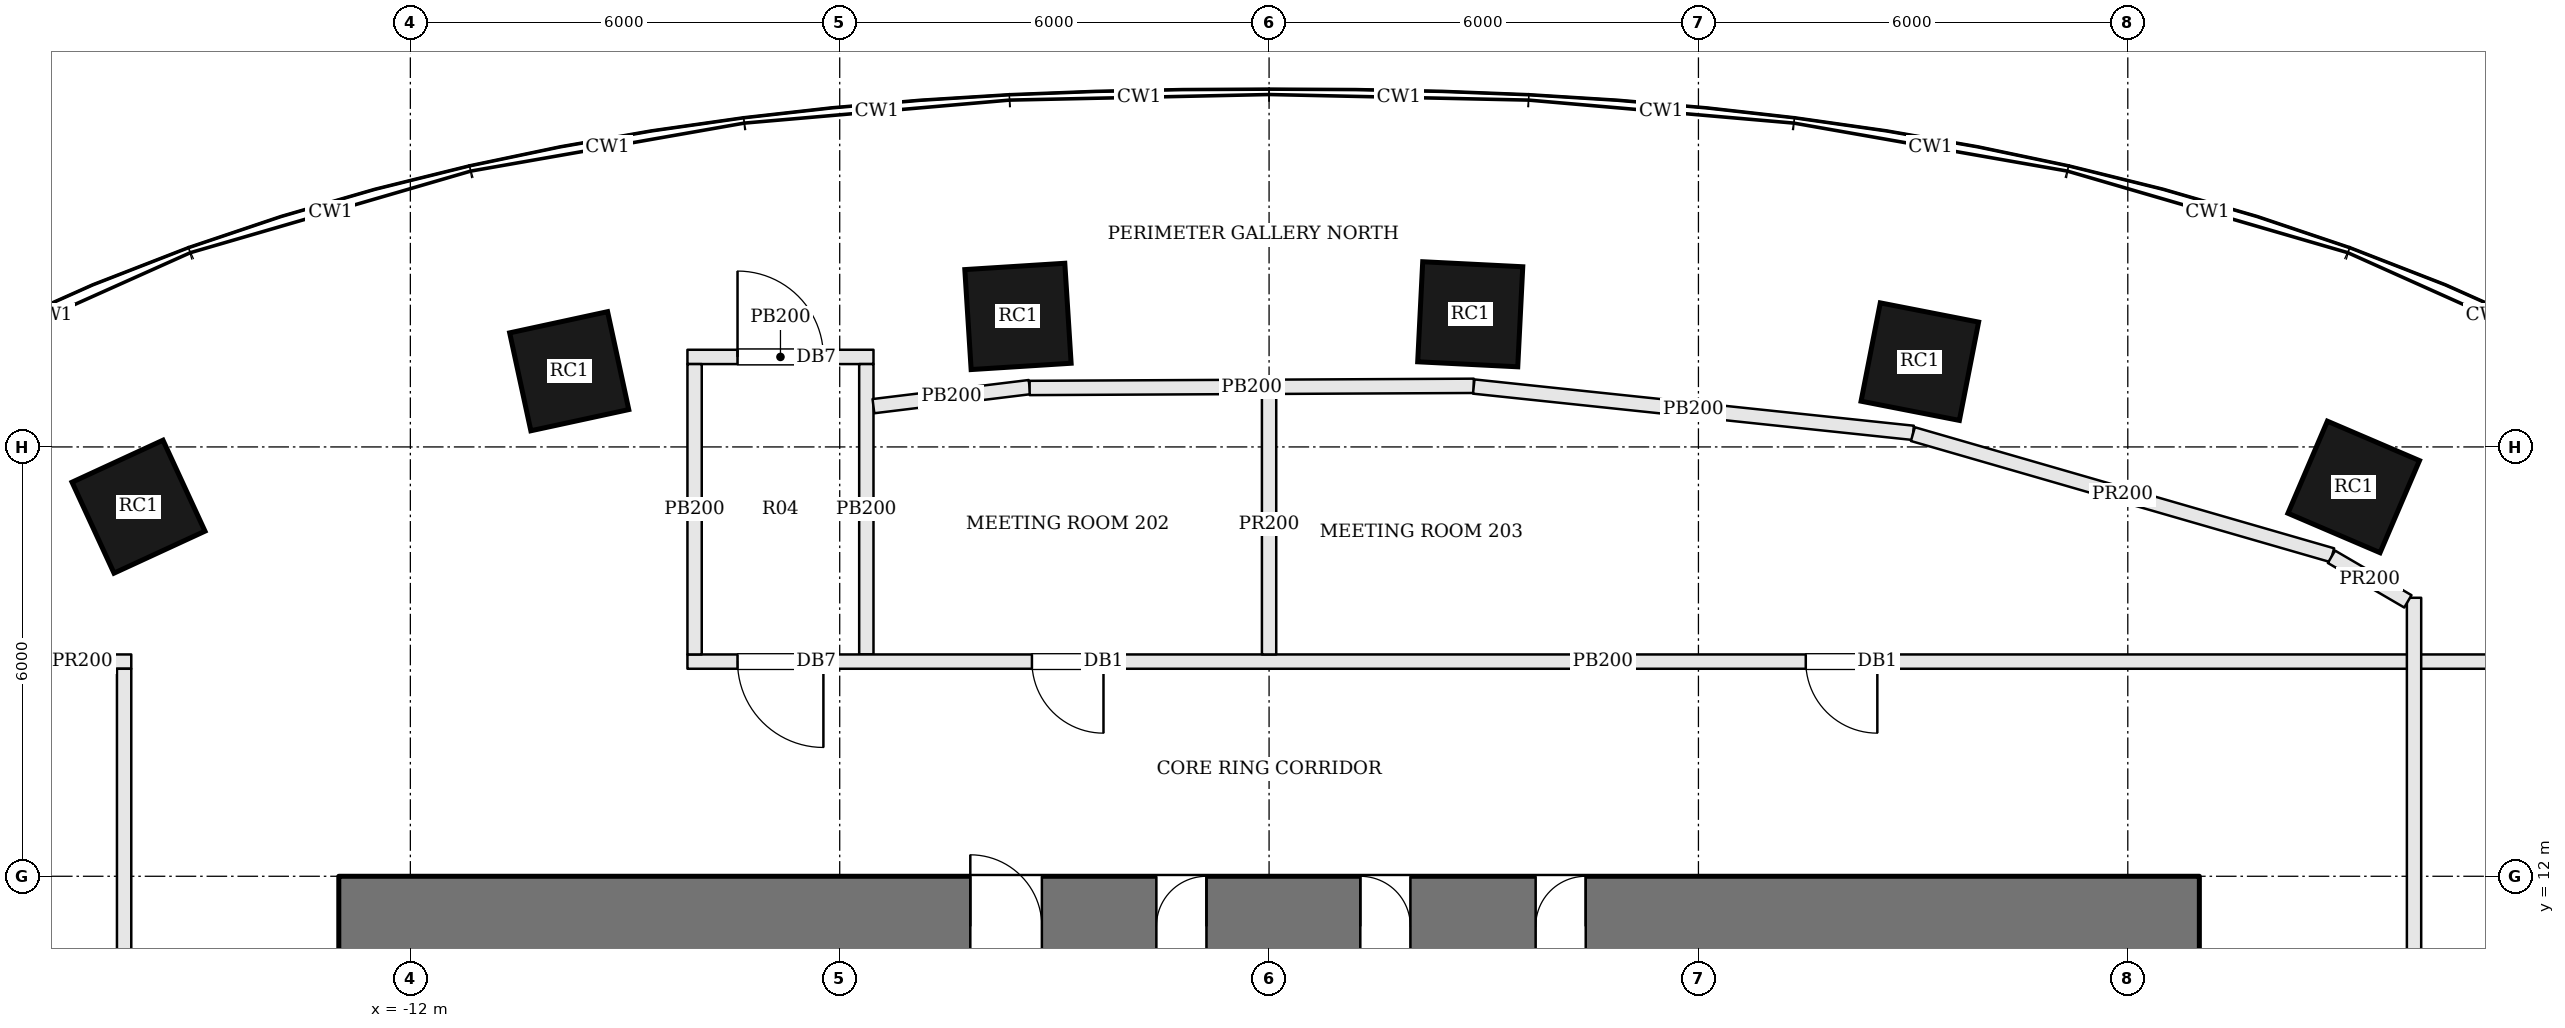
"""IFC4 building model, lengths in metres.
Left out: names, types, materials, properties, quantities, classifications, styles, units other than length and angle.
Written with IfcOpenShell. Run it as: python <this file> out.ifc"""

import sys

from ifc_helpers import new_model, si_unit, direction, frame, frame_2d, origin, origin_2d, place, context, subcontext, project, spatial, rectangle, extrude, element, fill, save


model = new_model("IFC4")
c1 = context("Model", 3, precision=1e-05, world=origin(), true_north=direction((0.0, 1.0)))
c2 = subcontext(c1, "Body", "Model", "MODEL_VIEW")
j1 = project(units=[si_unit("LENGTHUNIT", "METRE"), si_unit("PLANEANGLEUNIT", "RADIAN")], contexts=[c1])
p1 = place(None, origin())
s1 = spatial("IfcSite", under=j1, at=p1, CompositionType="ELEMENT")
p2 = place(p1, origin())
s2 = spatial("IfcBuilding", under=s1, at=p2, CompositionType="ELEMENT")
p3 = place(p2, frame((0.0, 0.0, 15.0)))
s3 = spatial("IfcBuildingStorey", under=s2, at=p3, CompositionType="ELEMENT", Elevation=15.0)
p4 = place(p3, frame((-13.0, 11.3, 0.0), z_axis=(0.0, 0.0, 1.0), x_axis=(1.0, 0.0, 0.0)))
e1 = element("IfcWall", 1, at=p4, inside=s3, PredefinedType="SHEAR", context=c2, shape_type="SweptSolid", body=[
    extrude(rectangle(XDim=26.0, YDim=1.4, at=frame_2d((13.0, 0.0))), origin(), (0.0, 0.0, 1.0), 7.8),
])
p5 = place(p4, frame((8.825, 0.0, 0.0)))
e2 = element("IfcOpeningElement", 2, at=p5, cuts=e1, PredefinedType="OPENING", context=c2, shape_type="SweptSolid", body=[
    extrude(rectangle(XDim=1.0, YDim=2.1, at=frame_2d((0.5, 1.05))), frame((0.0, 0.71, 0.0), z_axis=(0.0, -1.0, 0.0), x_axis=(1.0, 0.0, 0.0)), (0.0, 0.0, 1.0), 1.42),
])
p6 = place(p4, frame((11.425, 0.0, 0.0)))
e3 = element("IfcOpeningElement", 3, at=p6, cuts=e1, PredefinedType="OPENING", context=c2, shape_type="SweptSolid", body=[
    extrude(rectangle(XDim=0.7, YDim=2.1, at=frame_2d((0.35, 1.05))), frame((0.0, 0.71, 0.0), z_axis=(0.0, -1.0, 0.0), x_axis=(1.0, 0.0, 0.0)), (0.0, 0.0, 1.0), 1.42),
])
p7 = place(p4, frame((14.275, 0.0, 0.0)))
e4 = element("IfcOpeningElement", 4, at=p7, cuts=e1, PredefinedType="OPENING", context=c2, shape_type="SweptSolid", body=[
    extrude(rectangle(XDim=0.7, YDim=2.1, at=frame_2d((0.35, 1.05))), frame((0.0, 0.71, 0.0), z_axis=(0.0, -1.0, 0.0), x_axis=(1.0, 0.0, 0.0)), (0.0, 0.0, 1.0), 1.42),
])
p8 = place(p4, frame((16.725, 0.0, 0.0)))
e5 = element("IfcOpeningElement", 5, at=p8, cuts=e1, PredefinedType="OPENING", context=c2, shape_type="SweptSolid", body=[
    extrude(rectangle(XDim=0.7, YDim=2.1, at=frame_2d((0.35, 1.05))), frame((0.0, 0.71, 0.0), z_axis=(0.0, -1.0, 0.0), x_axis=(1.0, 0.0, 0.0)), (0.0, 0.0, 1.0), 1.42),
])
for number, where, z_axis, x_axis in (
    (6, (15.157, 17.441, 0.0), (0.0, 0.0, 1.0), (-0.919, 0.394, 0.0)),
    (7, (9.094, 19.192, 0.0), (0.0, 0.0, 1.0), (-0.981, 0.192, 0.0)),
    (8, (2.811, 19.854, 0.0), (0.0, 0.0, 1.0), (-0.999, 0.05, 0.0)),
    (9, (-3.509, 19.824, 0.0), (0.0, 0.0, 1.0), (-0.998, -0.063, 0.0)),
    (10, (-9.78, 19.058, 0.0), (0.0, 0.0, 1.0), (-0.977, -0.211, 0.0)),
    (11, (-15.799, 17.165, 0.0), (0.0, 0.0, 1.0), (-0.908, -0.419, 0.0)),
):
    element("IfcColumn", number, at=place(p3, frame(where, z_axis=z_axis, x_axis=x_axis)), inside=s3, PredefinedType="COLUMN", context=c2, shape_type="SweptSolid", body=[
        extrude(rectangle(XDim=1.4, YDim=1.4, at=origin_2d()), origin(), (0.0, 0.0, 1.0), 7.8),
    ])
p9 = place(p3, frame((-8.128, 19.258, 0.0), z_axis=(0.0, 0.0, 1.0), x_axis=(1.0, 0.0, 0.0)))
e12 = element("IfcWall", 12, at=p9, inside=s3, PredefinedType="PARTITIONING", context=c2, shape_type="SweptSolid", body=[
    extrude(rectangle(XDim=2.6, YDim=0.2, at=frame_2d((1.3, 0.0))), origin(), (0.0, 0.0, 1.0), 6.83),
])
p10 = place(p9, frame((0.7, 0.0, 0.0)))
e13 = element("IfcOpeningElement", 13, at=p10, cuts=e12, PredefinedType="OPENING", context=c2, shape_type="SweptSolid", body=[
    extrude(rectangle(XDim=1.2, YDim=2.1, at=frame_2d((0.6, 1.05))), frame((0.0, 0.11, 0.0), z_axis=(0.0, -1.0, 0.0), x_axis=(1.0, 0.0, 0.0)), (0.0, 0.0, 1.0), 0.22),
])
p11 = place(p3, frame((-5.628, 19.158, 0.0), z_axis=(0.0, 0.0, 1.0), x_axis=(0.0, -1.0, 0.0)))
e14 = element("IfcWall", 14, at=p11, inside=s3, PredefinedType="PARTITIONING", context=c2, shape_type="SweptSolid", body=[
    extrude(rectangle(XDim=4.058, YDim=0.2, at=frame_2d((2.029, 0.0))), origin(), (0.0, 0.0, 1.0), 6.83),
])
p12 = place(p3, frame((17.457, 15.0, 0.0), z_axis=(0.0, 0.0, 1.0), x_axis=(-1.0, 0.0, 0.0)))
e15 = element("IfcWall", 15, at=p12, inside=s3, PredefinedType="PARTITIONING", context=c2, shape_type="SweptSolid", body=[
    extrude(rectangle(XDim=25.585, YDim=0.2, at=frame_2d((12.792, 0.0))), origin(), (0.0, 0.0, 1.0), 6.83),
])
p13 = place(p12, frame((23.685, 0.0, 0.0)))
e16 = element("IfcOpeningElement", 16, at=p13, cuts=e15, PredefinedType="OPENING", context=c2, shape_type="SweptSolid", body=[
    extrude(rectangle(XDim=1.2, YDim=2.1, at=frame_2d((0.6, 1.05))), frame((0.0, 0.11, 0.0), z_axis=(0.0, -1.0, 0.0), x_axis=(1.0, 0.0, 0.0)), (0.0, 0.0, 1.0), 0.22),
])
p14 = place(p12, frame((19.771, 0.0, 0.0)))
e17 = element("IfcOpeningElement", 17, at=p14, cuts=e15, PredefinedType="OPENING", context=c2, shape_type="SweptSolid", body=[
    extrude(rectangle(XDim=1.0, YDim=2.1, at=frame_2d((0.5, 1.05))), frame((0.0, 0.11, 0.0), z_axis=(0.0, -1.0, 0.0), x_axis=(1.0, 0.0, 0.0)), (0.0, 0.0, 1.0), 0.22),
])
p15 = place(p12, frame((8.957, 0.0, 0.0)))
e18 = element("IfcOpeningElement", 18, at=p15, cuts=e15, PredefinedType="OPENING", context=c2, shape_type="SweptSolid", body=[
    extrude(rectangle(XDim=1.0, YDim=2.1, at=frame_2d((0.5, 1.05))), frame((0.0, 0.11, 0.0), z_axis=(0.0, -1.0, 0.0), x_axis=(1.0, 0.0, 0.0)), (0.0, 0.0, 1.0), 0.22),
])
p16 = place(p3, frame((-8.028, 15.1, 0.0), z_axis=(0.0, 0.0, 1.0), x_axis=(0.0, 1.0, 0.0)))
e19 = element("IfcWall", 19, at=p16, inside=s3, PredefinedType="PARTITIONING", context=c2, shape_type="SweptSolid", body=[
    extrude(rectangle(XDim=4.058, YDim=0.2, at=frame_2d((2.029, 0.0))), origin(), (0.0, 0.0, 1.0), 6.83),
])
p17 = place(p3, frame((-17.268, 15.0, 0.0), z_axis=(0.0, 0.0, 1.0), x_axis=(1.0, 0.0, 0.0)))
e20 = element("IfcWall", 20, at=p17, inside=s3, PredefinedType="PARTITIONING", context=c2, shape_type="SweptSolid", body=[
    extrude(rectangle(XDim=1.368, YDim=0.2, at=frame_2d((0.684, 0.0))), origin(), (0.0, 0.0, 1.0), 6.934),
])
p18 = place(p3, frame((-16.0, 14.9, 0.0), z_axis=(0.0, 0.0, 1.0), x_axis=(0.0, -1.0, 0.0)))
e21 = element("IfcWall", 21, at=p18, inside=s3, PredefinedType="PARTITIONING", context=c2, shape_type="SweptSolid", body=[
    extrude(rectangle(XDim=20.8, YDim=0.2, at=frame_2d((10.4, 0.0))), origin(), (0.0, 0.0, 1.0), 6.83),
])
p19 = place(p18, frame((9.9, 0.0, 0.0)))
e22 = element("IfcOpeningElement", 22, at=p19, cuts=e21, PredefinedType="OPENING", context=c2, shape_type="SweptSolid", body=[
    extrude(rectangle(XDim=1.0, YDim=2.1, at=frame_2d((0.5, 1.05))), frame((0.0, 0.11, 0.0), z_axis=(0.0, -1.0, 0.0), x_axis=(1.0, 0.0, 0.0)), (0.0, 0.0, 1.0), 0.22),
])
p20 = place(p3, frame((16.0, -5.9, 0.0), z_axis=(0.0, 0.0, 1.0), x_axis=(0.0, 1.0, 0.0)))
e23 = element("IfcWall", 23, at=p20, inside=s3, PredefinedType="PARTITIONING", context=c2, shape_type="SweptSolid", body=[
    extrude(rectangle(XDim=21.792, YDim=0.2, at=frame_2d((10.896, 0.0))), origin(), (0.0, 0.0, 1.0), 6.83),
])
p21 = place(p20, frame((9.9, 0.0, 0.0)))
e24 = element("IfcOpeningElement", 24, at=p21, cuts=e23, PredefinedType="OPENING", context=c2, shape_type="SweptSolid", body=[
    extrude(rectangle(XDim=1.0, YDim=2.1, at=frame_2d((0.5, 1.05))), frame((0.0, 0.11, 0.0), z_axis=(0.0, -1.0, 0.0), x_axis=(1.0, 0.0, 0.0)), (0.0, 0.0, 1.0), 0.22),
])
p22 = place(p3, frame((-5.529, 18.57, 0.0), z_axis=(0.0, 0.0, 1.0), x_axis=(0.992659217013, 0.120944941522, 0.0)))
e25 = element("IfcWall", 25, at=p22, inside=s3, PredefinedType="PARTITIONING", context=c2, shape_type="SweptSolid", body=[
    extrude(rectangle(XDim=2.198, YDim=0.2, at=frame_2d((1.099, 0.0))), origin(), (0.0, 0.0, 1.0), 6.83),
])
p23 = place(p3, frame((-3.346, 18.824, 0.0), z_axis=(0.0, 0.0, 1.0), x_axis=(0.999988297333, 0.004837891778, 0.0)))
e26 = element("IfcWall", 26, at=p23, inside=s3, PredefinedType="PARTITIONING", context=c2, shape_type="SweptSolid", body=[
    extrude(rectangle(XDim=6.207, YDim=0.2, at=frame_2d((3.104, 0.0))), origin(), (0.0, 0.0, 1.0), 6.83),
])
p24 = place(p3, frame((0.0, 18.741, 0.0), z_axis=(0.0, 0.0, 1.0), x_axis=(0.0, -1.0, 0.0)))
e27 = element("IfcWall", 27, at=p24, inside=s3, PredefinedType="PARTITIONING", context=c2, shape_type="SweptSolid", body=[
    extrude(rectangle(XDim=3.641, YDim=0.2, at=frame_2d((1.82, 0.0))), origin(), (0.0, 0.0, 1.0), 6.934),
])
p25 = place(p3, frame((2.86, 18.844, 0.0), z_axis=(0.0, 0.0, 1.0), x_axis=(0.994494179805, -0.10479182379, 0.0)))
e28 = element("IfcWall", 28, at=p25, inside=s3, PredefinedType="PARTITIONING", context=c2, shape_type="SweptSolid", body=[
    extrude(rectangle(XDim=6.174, YDim=0.2, at=frame_2d((3.087, 0.0))), origin(), (0.0, 0.0, 1.0), 6.83),
])
p26 = place(p3, frame((8.997, 18.179, 0.0), z_axis=(0.0, 0.0, 1.0), x_axis=(0.960743591904, -0.277437831982, 0.0)))
e29 = element("IfcWall", 29, at=p26, inside=s3, PredefinedType="PARTITIONING", context=c2, shape_type="SweptSolid", body=[
    extrude(rectangle(XDim=6.098, YDim=0.2, at=frame_2d((3.049, 0.0))), origin(), (0.0, 0.0, 1.0), 6.934),
])
p27 = place(p3, frame((14.846, 16.465, 0.0), z_axis=(0.0, 0.0, 1.0), x_axis=(0.863786061732, -0.503858749609, 0.0)))
e30 = element("IfcWall", 30, at=p27, inside=s3, PredefinedType="PARTITIONING", context=c2, shape_type="SweptSolid", body=[
    extrude(rectangle(XDim=1.237, YDim=0.2, at=frame_2d((0.618, 0.0))), origin(), (0.0, 0.0, 1.0), 6.934),
])
p28 = place(p5, origin())
e31 = element("IfcDoor", 31, at=p28, inside=s3, OperationType="SINGLE_SWING_LEFT", PredefinedType="DOOR", context=c2, shape_type="SweptSolid", body=[
    extrude(rectangle(XDim=1.0, YDim=2.1, at=frame_2d((0.5, 1.05))), frame((0.0, 0.025, 0.0), z_axis=(0.0, -1.0, 0.0), x_axis=(1.0, 0.0, 0.0)), (0.0, 0.0, 1.0), 0.05),
])
fill(e2, e31)
p29 = place(p6, origin())
e32 = element("IfcDoor", 32, at=p29, inside=s3, OperationType="SINGLE_SWING_RIGHT", PredefinedType="DOOR", context=c2, shape_type="SweptSolid", body=[
    extrude(rectangle(XDim=0.7, YDim=2.1, at=frame_2d((0.35, 1.05))), frame((0.0, 0.025, 0.0), z_axis=(0.0, -1.0, 0.0), x_axis=(1.0, 0.0, 0.0)), (0.0, 0.0, 1.0), 0.05),
])
fill(e3, e32)
p30 = place(p7, origin())
e33 = element("IfcDoor", 33, at=p30, inside=s3, OperationType="SINGLE_SWING_LEFT", PredefinedType="DOOR", context=c2, shape_type="SweptSolid", body=[
    extrude(rectangle(XDim=0.7, YDim=2.1, at=frame_2d((0.35, 1.05))), frame((0.0, 0.025, 0.0), z_axis=(0.0, -1.0, 0.0), x_axis=(1.0, 0.0, 0.0)), (0.0, 0.0, 1.0), 0.05),
])
fill(e4, e33)
p31 = place(p8, origin())
e34 = element("IfcDoor", 34, at=p31, inside=s3, OperationType="SINGLE_SWING_RIGHT", PredefinedType="DOOR", context=c2, shape_type="SweptSolid", body=[
    extrude(rectangle(XDim=0.7, YDim=2.1, at=frame_2d((0.35, 1.05))), frame((0.0, 0.025, 0.0), z_axis=(0.0, -1.0, 0.0), x_axis=(1.0, 0.0, 0.0)), (0.0, 0.0, 1.0), 0.05),
])
fill(e5, e34)
p32 = place(p13, origin())
e35 = element("IfcDoor", 35, at=p32, inside=s3, OperationType="SINGLE_SWING_LEFT", PredefinedType="DOOR", context=c2, shape_type="SweptSolid", body=[
    extrude(rectangle(XDim=1.2, YDim=2.1, at=frame_2d((0.6, 1.05))), frame((0.0, 0.025, 0.0), z_axis=(0.0, -1.0, 0.0), x_axis=(1.0, 0.0, 0.0)), (0.0, 0.0, 1.0), 0.05),
])
fill(e16, e35)
p33 = place(p10, origin())
e36 = element("IfcDoor", 36, at=p33, inside=s3, OperationType="SINGLE_SWING_LEFT", PredefinedType="DOOR", context=c2, shape_type="SweptSolid", body=[
    extrude(rectangle(XDim=1.2, YDim=2.1, at=frame_2d((0.6, 1.05))), frame((0.0, 0.025, 0.0), z_axis=(0.0, -1.0, 0.0), x_axis=(1.0, 0.0, 0.0)), (0.0, 0.0, 1.0), 0.05),
])
fill(e13, e36)
p34 = place(p14, origin())
e37 = element("IfcDoor", 37, at=p34, inside=s3, OperationType="SINGLE_SWING_LEFT", PredefinedType="DOOR", context=c2, shape_type="SweptSolid", body=[
    extrude(rectangle(XDim=1.0, YDim=2.1, at=frame_2d((0.5, 1.05))), frame((0.0, 0.025, 0.0), z_axis=(0.0, -1.0, 0.0), x_axis=(1.0, 0.0, 0.0)), (0.0, 0.0, 1.0), 0.05),
])
fill(e17, e37)
p35 = place(p15, origin())
e38 = element("IfcDoor", 38, at=p35, inside=s3, OperationType="SINGLE_SWING_LEFT", PredefinedType="DOOR", context=c2, shape_type="SweptSolid", body=[
    extrude(rectangle(XDim=1.0, YDim=2.1, at=frame_2d((0.5, 1.05))), frame((0.0, 0.025, 0.0), z_axis=(0.0, -1.0, 0.0), x_axis=(1.0, 0.0, 0.0)), (0.0, 0.0, 1.0), 0.05),
])
fill(e18, e38)
save(model, sys.argv[1])
